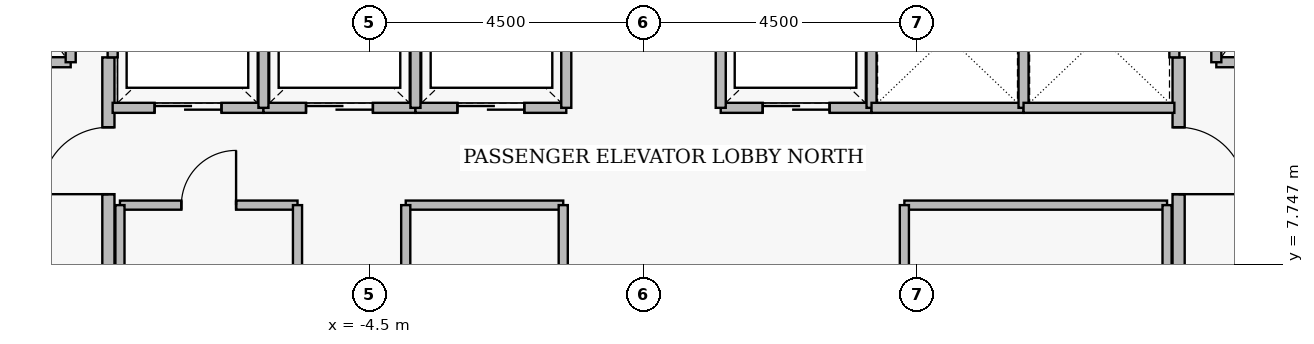
"""IFC4 building model, lengths in metres.
Left out: names, types, materials, properties, quantities, classifications, styles, units other than length and angle.
Written with IfcOpenShell. Run it as: python <this file> out.ifc"""

import sys

from ifc_helpers import new_model, si_unit, direction, frame, frame_2d, origin, place, context, subcontext, project, spatial, rectangle, extrude, element, fill, save


model = new_model("IFC4")
c1 = context("Model", 3, precision=1e-05, world=origin(), true_north=direction((0.0, 1.0)))
c2 = subcontext(c1, "Body", "Model", "MODEL_VIEW")
j1 = project(units=[si_unit("LENGTHUNIT", "METRE"), si_unit("PLANEANGLEUNIT", "RADIAN")], contexts=[c1])
p1 = place(None, origin())
s1 = spatial("IfcSite", under=j1, at=p1, CompositionType="ELEMENT")
p2 = place(p1, origin())
s2 = spatial("IfcBuilding", under=s1, at=p2, CompositionType="ELEMENT")
p3 = place(p2, frame((0.0, 0.0, 6.0)))
s3 = spatial("IfcBuildingStorey", under=s2, at=p3, CompositionType="ELEMENT", Elevation=6.0)
p4 = place(p3, frame((-8.8, 5.05, 0.0), z_axis=(0.0, 0.0, 1.0), x_axis=(0.0, 1.0, 0.0)))
e1 = element("IfcWall", 1, at=p4, inside=s3, PredefinedType="PARTITIONING", context=c2, shape_type="SweptSolid", body=[
    extrude(rectangle(XDim=6.1, YDim=0.2, at=frame_2d((3.05, 0.0))), origin(), (0.0, 0.0, 1.0), 5.14),
])
p5 = place(p4, frame((0.25, 0.0, 0.0)))
e2 = element("IfcOpeningElement", 2, at=p5, cuts=e1, PredefinedType="OPENING", context=c2, shape_type="SweptSolid", body=[
    extrude(rectangle(XDim=1.1, YDim=2.2, at=frame_2d((0.55, 1.1))), frame((0.0, 0.11, 0.0), z_axis=(0.0, -1.0, 0.0), x_axis=(1.0, 0.0, 0.0)), (0.0, 0.0, 1.0), 0.22),
])
p6 = place(p4, frame((3.85, 0.0, 0.0)))
e3 = element("IfcOpeningElement", 3, at=p6, cuts=e1, PredefinedType="OPENING", context=c2, shape_type="SweptSolid", body=[
    extrude(rectangle(XDim=1.1, YDim=2.2, at=frame_2d((0.55, 1.1))), frame((0.0, 0.11, 0.0), z_axis=(0.0, -1.0, 0.0), x_axis=(1.0, 0.0, 0.0)), (0.0, 0.0, 1.0), 0.22),
])
p7 = place(p3, frame((8.8, 11.15, 0.0), z_axis=(0.0, 0.0, 1.0), x_axis=(0.0, -1.0, 0.0)))
e4 = element("IfcWall", 4, at=p7, inside=s3, PredefinedType="PARTITIONING", context=c2, shape_type="SweptSolid", body=[
    extrude(rectangle(XDim=6.1, YDim=0.2, at=frame_2d((3.05, 0.0))), origin(), (0.0, 0.0, 1.0), 5.14),
])
p8 = place(p7, frame((1.15, 0.0, 0.0)))
e5 = element("IfcOpeningElement", 5, at=p8, cuts=e4, PredefinedType="OPENING", context=c2, shape_type="SweptSolid", body=[
    extrude(rectangle(XDim=1.1, YDim=2.2, at=frame_2d((0.55, 1.1))), frame((0.0, 0.11, 0.0), z_axis=(0.0, -1.0, 0.0), x_axis=(1.0, 0.0, 0.0)), (0.0, 0.0, 1.0), 0.22),
])
p9 = place(p7, frame((4.75, 0.0, 0.0)))
e6 = element("IfcOpeningElement", 6, at=p9, cuts=e4, PredefinedType="OPENING", context=c2, shape_type="SweptSolid", body=[
    extrude(rectangle(XDim=1.1, YDim=2.2, at=frame_2d((0.55, 1.1))), frame((0.0, 0.11, 0.0), z_axis=(0.0, -1.0, 0.0), x_axis=(1.0, 0.0, 0.0)), (0.0, 0.0, 1.0), 0.22),
])
p10 = place(p3, frame((-11.58, 11.07, 0.0), z_axis=(0.0, 0.0, 1.0), x_axis=(1.0, 0.0, 0.0)))
e7 = element("IfcWall", 7, at=p10, inside=s3, PredefinedType="PARTITIONING", context=c2, shape_type="SweptSolid", body=[
    extrude(rectangle(XDim=2.16, YDim=0.165, at=frame_2d((1.08, 0.0))), origin(), (0.0, 0.0, 1.0), 5.14),
])
p11 = place(p10, frame((0.53, 0.0, 0.0)))
e8 = element("IfcOpeningElement", 8, at=p11, cuts=e7, PredefinedType="OPENING", context=c2, shape_type="SweptSolid", body=[
    extrude(rectangle(XDim=1.15, YDim=2.25, at=frame_2d((0.575, 1.125))), frame((0.0, 0.093, 0.0), z_axis=(0.0, -1.0, 0.0), x_axis=(1.0, 0.0, 0.0)), (0.0, 0.0, 1.0), 0.185),
])
p12 = place(p3, frame((9.42, 11.07, 0.0), z_axis=(0.0, 0.0, 1.0), x_axis=(1.0, 0.0, 0.0)))
e9 = element("IfcWall", 9, at=p12, inside=s3, PredefinedType="PARTITIONING", context=c2, shape_type="SweptSolid", body=[
    extrude(rectangle(XDim=2.16, YDim=0.165, at=frame_2d((1.08, 0.0))), origin(), (0.0, 0.0, 1.0), 5.14),
])
p13 = place(p12, frame((0.53, 0.0, 0.0)))
e10 = element("IfcOpeningElement", 10, at=p13, cuts=e9, PredefinedType="OPENING", context=c2, shape_type="SweptSolid", body=[
    extrude(rectangle(XDim=1.15, YDim=2.25, at=frame_2d((0.575, 1.125))), frame((0.0, 0.093, 0.0), z_axis=(0.0, -1.0, 0.0), x_axis=(1.0, 0.0, 0.0)), (0.0, 0.0, 1.0), 0.185),
])
p14 = place(p3, frame((-8.73, 10.32, 0.0), z_axis=(0.0, 0.0, 1.0), x_axis=(1.0, 0.0, 0.0)))
e11 = element("IfcWall", 11, at=p14, inside=s3, PredefinedType="PARTITIONING", context=c2, shape_type="SweptSolid", body=[
    extrude(rectangle(XDim=2.48, YDim=0.165, at=frame_2d((1.24, 0.0))), origin(), (0.0, 0.0, 1.0), 5.14),
])
p15 = place(p14, frame((0.69, 0.0, 0.0)))
e12 = element("IfcOpeningElement", 12, at=p15, cuts=e11, PredefinedType="OPENING", context=c2, shape_type="SweptSolid", body=[
    extrude(rectangle(XDim=1.1, YDim=2.25, at=frame_2d((0.55, 1.125))), frame((0.0, 0.093, 0.0), z_axis=(0.0, -1.0, 0.0), x_axis=(1.0, 0.0, 0.0)), (0.0, 0.0, 1.0), 0.185),
])
p16 = place(p3, frame((-6.25, 10.32, 0.0), z_axis=(0.0, 0.0, 1.0), x_axis=(1.0, 0.0, 0.0)))
e13 = element("IfcWall", 13, at=p16, inside=s3, PredefinedType="PARTITIONING", context=c2, shape_type="SweptSolid", body=[
    extrude(rectangle(XDim=2.5, YDim=0.165, at=frame_2d((1.25, 0.0))), origin(), (0.0, 0.0, 1.0), 5.14),
])
p17 = place(p16, frame((0.7, 0.0, 0.0)))
e14 = element("IfcOpeningElement", 14, at=p17, cuts=e13, PredefinedType="OPENING", context=c2, shape_type="SweptSolid", body=[
    extrude(rectangle(XDim=1.1, YDim=2.25, at=frame_2d((0.55, 1.125))), frame((0.0, 0.093, 0.0), z_axis=(0.0, -1.0, 0.0), x_axis=(1.0, 0.0, 0.0)), (0.0, 0.0, 1.0), 0.185),
])
p18 = place(p3, frame((-3.75, 10.32, 0.0), z_axis=(0.0, 0.0, 1.0), x_axis=(1.0, 0.0, 0.0)))
e15 = element("IfcWall", 15, at=p18, inside=s3, PredefinedType="PARTITIONING", context=c2, shape_type="SweptSolid", body=[
    extrude(rectangle(XDim=2.48, YDim=0.165, at=frame_2d((1.24, 0.0))), origin(), (0.0, 0.0, 1.0), 5.14),
])
p19 = place(p18, frame((0.69, 0.0, 0.0)))
e16 = element("IfcOpeningElement", 16, at=p19, cuts=e15, PredefinedType="OPENING", context=c2, shape_type="SweptSolid", body=[
    extrude(rectangle(XDim=1.1, YDim=2.25, at=frame_2d((0.55, 1.125))), frame((0.0, 0.093, 0.0), z_axis=(0.0, -1.0, 0.0), x_axis=(1.0, 0.0, 0.0)), (0.0, 0.0, 1.0), 0.185),
])
p20 = place(p3, frame((1.27, 10.32, 0.0), z_axis=(0.0, 0.0, 1.0), x_axis=(1.0, 0.0, 0.0)))
e17 = element("IfcWall", 17, at=p20, inside=s3, PredefinedType="PARTITIONING", context=c2, shape_type="SweptSolid", body=[
    extrude(rectangle(XDim=2.48, YDim=0.165, at=frame_2d((1.24, 0.0))), origin(), (0.0, 0.0, 1.0), 5.14),
])
p21 = place(p20, frame((0.69, 0.0, 0.0)))
e18 = element("IfcOpeningElement", 18, at=p21, cuts=e17, PredefinedType="OPENING", context=c2, shape_type="SweptSolid", body=[
    extrude(rectangle(XDim=1.1, YDim=2.25, at=frame_2d((0.55, 1.125))), frame((0.0, 0.093, 0.0), z_axis=(0.0, -1.0, 0.0), x_axis=(1.0, 0.0, 0.0)), (0.0, 0.0, 1.0), 0.185),
])
p22 = place(p3, frame((-8.61, 8.72, 0.0), z_axis=(0.0, 0.0, 1.0), x_axis=(1.0, 0.0, 0.0)))
e19 = element("IfcWall", 19, at=p22, inside=s3, PredefinedType="PARTITIONING", context=c2, shape_type="SweptSolid", body=[
    extrude(rectangle(XDim=2.92, YDim=0.15, at=frame_2d((1.46, 0.0))), origin(), (0.0, 0.0, 1.0), 5.14),
])
p23 = place(p22, frame((1.01, 0.0, 0.0)))
e20 = element("IfcOpeningElement", 20, at=p23, cuts=e19, PredefinedType="OPENING", context=c2, shape_type="SweptSolid", body=[
    extrude(rectangle(XDim=0.9, YDim=2.15, at=frame_2d((0.45, 1.075))), frame((0.0, 0.085, 0.0), z_axis=(0.0, -1.0, 0.0), x_axis=(1.0, 0.0, 0.0)), (0.0, 0.0, 1.0), 0.17),
])
for number, where, z_axis, x_axis in (
    (21, (-9.42, 11.07, 0.0), (0.0, 0.0, 1.0), (0.0, 1.0, 0.0)),
    (22, (9.42, 11.07, 0.0), (0.0, 0.0, 1.0), (0.0, 1.0, 0.0)),
):
    element("IfcWall", number, at=place(p3, frame(where, z_axis=z_axis, x_axis=x_axis)), inside=s3, PredefinedType="PARTITIONING", context=c2, shape_type="SweptSolid", body=[
        extrude(rectangle(XDim=2.96, YDim=0.165, at=frame_2d((1.48, 0.0))), origin(), (0.0, 0.0, 1.0), 5.14),
    ])
p24 = place(p3, frame((-8.73, 11.15, 0.0), z_axis=(0.0, 0.0, 1.0), x_axis=(0.0, 1.0, 0.0)))
e23 = element("IfcWall", 23, at=p24, inside=s3, PredefinedType="PARTITIONING", context=c2, shape_type="SweptSolid", body=[
    extrude(rectangle(XDim=1.53, YDim=0.165, at=frame_2d((0.765, 0.0))), origin(), (0.0, 0.0, 1.0), 5.14),
])
for number, where, z_axis, x_axis in (
    (24, (-6.25, 10.32, 0.0), (0.0, 0.0, 1.0), (0.0, 1.0, 0.0)),
    (25, (-3.75, 10.32, 0.0), (0.0, 0.0, 1.0), (0.0, 1.0, 0.0)),
    (26, (-1.27, 10.32, 0.0), (0.0, 0.0, 1.0), (0.0, 1.0, 0.0)),
    (27, (1.27, 10.32, 0.0), (0.0, 0.0, 1.0), (0.0, 1.0, 0.0)),
    (28, (3.75, 10.32, 0.0), (0.0, 0.0, 1.0), (0.0, 1.0, 0.0)),
):
    element("IfcWall", number, at=place(p3, frame(where, z_axis=z_axis, x_axis=x_axis)), inside=s3, PredefinedType="PARTITIONING", context=c2, shape_type="SweptSolid", body=[
        extrude(rectangle(XDim=2.36, YDim=0.165, at=frame_2d((1.18, 0.0))), origin(), (0.0, 0.0, 1.0), 5.14),
    ])
p25 = place(p3, frame((3.75, 10.32, 0.0), z_axis=(0.0, 0.0, 1.0), x_axis=(1.0, 0.0, 0.0)))
e29 = element("IfcWall", 29, at=p25, inside=s3, PredefinedType="PARTITIONING", context=c2, shape_type="SweptSolid", body=[
    extrude(rectangle(XDim=2.5, YDim=0.165, at=frame_2d((1.25, 0.0))), origin(), (0.0, 0.0, 1.0), 5.14),
])
p26 = place(p3, frame((6.25, 10.32, 0.0), z_axis=(0.0, 0.0, 1.0), x_axis=(0.0, 1.0, 0.0)))
e30 = element("IfcWall", 30, at=p26, inside=s3, PredefinedType="PARTITIONING", context=c2, shape_type="SweptSolid", body=[
    extrude(rectangle(XDim=2.36, YDim=0.165, at=frame_2d((1.18, 0.0))), origin(), (0.0, 0.0, 1.0), 5.14),
])
p27 = place(p3, frame((6.25, 10.32, 0.0), z_axis=(0.0, 0.0, 1.0), x_axis=(1.0, 0.0, 0.0)))
e31 = element("IfcWall", 31, at=p27, inside=s3, PredefinedType="PARTITIONING", context=c2, shape_type="SweptSolid", body=[
    extrude(rectangle(XDim=2.48, YDim=0.165, at=frame_2d((1.24, 0.0))), origin(), (0.0, 0.0, 1.0), 5.14),
])
p28 = place(p3, frame((8.73, 11.15, 0.0), z_axis=(0.0, 0.0, 1.0), x_axis=(0.0, 1.0, 0.0)))
e32 = element("IfcWall", 32, at=p28, inside=s3, PredefinedType="PARTITIONING", context=c2, shape_type="SweptSolid", body=[
    extrude(rectangle(XDim=1.53, YDim=0.165, at=frame_2d((0.765, 0.0))), origin(), (0.0, 0.0, 1.0), 5.14),
])
for number, where, z_axis, x_axis in (
    (33, (-8.61, 6.48, 0.0), (0.0, 0.0, 1.0), (0.0, 1.0, 0.0)),
    (34, (-5.69, 6.48, 0.0), (0.0, 0.0, 1.0), (0.0, 1.0, 0.0)),
):
    element("IfcWall", number, at=place(p3, frame(where, z_axis=z_axis, x_axis=x_axis)), inside=s3, PredefinedType="PARTITIONING", context=c2, shape_type="SweptSolid", body=[
        extrude(rectangle(XDim=2.24, YDim=0.15, at=frame_2d((1.12, 0.0))), origin(), (0.0, 0.0, 1.0), 5.14),
    ])
p29 = place(p3, frame((-3.91, 8.72, 0.0), z_axis=(0.0, 0.0, 1.0), x_axis=(1.0, 0.0, 0.0)))
e35 = element("IfcWall", 35, at=p29, inside=s3, PredefinedType="PARTITIONING", context=c2, shape_type="SweptSolid", body=[
    extrude(rectangle(XDim=2.59, YDim=0.15, at=frame_2d((1.295, 0.0))), origin(), (0.0, 0.0, 1.0), 5.14),
])
for number, where, z_axis, x_axis in (
    (36, (-3.91, 6.48, 0.0), (0.0, 0.0, 1.0), (0.0, 1.0, 0.0)),
    (37, (-1.32, 6.48, 0.0), (0.0, 0.0, 1.0), (0.0, 1.0, 0.0)),
):
    element("IfcWall", number, at=place(p3, frame(where, z_axis=z_axis, x_axis=x_axis)), inside=s3, PredefinedType="PARTITIONING", context=c2, shape_type="SweptSolid", body=[
        extrude(rectangle(XDim=2.24, YDim=0.15, at=frame_2d((1.12, 0.0))), origin(), (0.0, 0.0, 1.0), 5.14),
    ])
p30 = place(p3, frame((4.29, 8.72, 0.0), z_axis=(0.0, 0.0, 1.0), x_axis=(1.0, 0.0, 0.0)))
e38 = element("IfcWall", 38, at=p30, inside=s3, PredefinedType="PARTITIONING", context=c2, shape_type="SweptSolid", body=[
    extrude(rectangle(XDim=4.32, YDim=0.15, at=frame_2d((2.16, 0.0))), origin(), (0.0, 0.0, 1.0), 5.14),
])
for number, where, z_axis, x_axis in (
    (39, (4.29, 6.48, 0.0), (0.0, 0.0, 1.0), (0.0, 1.0, 0.0)),
    (40, (8.61, 6.48, 0.0), (0.0, 0.0, 1.0), (0.0, 1.0, 0.0)),
):
    element("IfcWall", number, at=place(p3, frame(where, z_axis=z_axis, x_axis=x_axis)), inside=s3, PredefinedType="PARTITIONING", context=c2, shape_type="SweptSolid", body=[
        extrude(rectangle(XDim=2.24, YDim=0.15, at=frame_2d((1.12, 0.0))), origin(), (0.0, 0.0, 1.0), 5.14),
    ])
p31 = place(p6, origin())
e41 = element("IfcDoor", 41, at=p31, inside=s3, OperationType="SINGLE_SWING_LEFT", PredefinedType="DOOR", context=c2, shape_type="SweptSolid", body=[
    extrude(rectangle(XDim=1.1, YDim=2.2, at=frame_2d((0.55, 1.1))), frame((0.0, 0.025, 0.0), z_axis=(0.0, -1.0, 0.0), x_axis=(1.0, 0.0, 0.0)), (0.0, 0.0, 1.0), 0.05),
])
fill(e3, e41)
p32 = place(p8, origin())
e42 = element("IfcDoor", 42, at=p32, inside=s3, OperationType="SINGLE_SWING_RIGHT", PredefinedType="DOOR", context=c2, shape_type="SweptSolid", body=[
    extrude(rectangle(XDim=1.1, YDim=2.2, at=frame_2d((0.55, 1.1))), frame((0.0, 0.025, 0.0), z_axis=(0.0, -1.0, 0.0), x_axis=(1.0, 0.0, 0.0)), (0.0, 0.0, 1.0), 0.05),
])
fill(e5, e42)
p33 = place(p15, origin())
e43 = element("IfcDoor", 43, at=p33, inside=s3, OperationType="SLIDING_TO_LEFT", PredefinedType="DOOR", context=c2, shape_type="SweptSolid", body=[
    extrude(rectangle(XDim=1.1, YDim=2.25, at=frame_2d((0.55, 1.125))), frame((0.0, 0.025, 0.0), z_axis=(0.0, -1.0, 0.0), x_axis=(1.0, 0.0, 0.0)), (0.0, 0.0, 1.0), 0.05),
])
fill(e12, e43)
p34 = place(p17, origin())
e44 = element("IfcDoor", 44, at=p34, inside=s3, OperationType="SLIDING_TO_LEFT", PredefinedType="DOOR", context=c2, shape_type="SweptSolid", body=[
    extrude(rectangle(XDim=1.1, YDim=2.25, at=frame_2d((0.55, 1.125))), frame((0.0, 0.025, 0.0), z_axis=(0.0, -1.0, 0.0), x_axis=(1.0, 0.0, 0.0)), (0.0, 0.0, 1.0), 0.05),
])
fill(e14, e44)
p35 = place(p19, origin())
e45 = element("IfcDoor", 45, at=p35, inside=s3, OperationType="SLIDING_TO_LEFT", PredefinedType="DOOR", context=c2, shape_type="SweptSolid", body=[
    extrude(rectangle(XDim=1.1, YDim=2.25, at=frame_2d((0.55, 1.125))), frame((0.0, 0.025, 0.0), z_axis=(0.0, -1.0, 0.0), x_axis=(1.0, 0.0, 0.0)), (0.0, 0.0, 1.0), 0.05),
])
fill(e16, e45)
p36 = place(p21, origin())
e46 = element("IfcDoor", 46, at=p36, inside=s3, OperationType="SLIDING_TO_LEFT", PredefinedType="DOOR", context=c2, shape_type="SweptSolid", body=[
    extrude(rectangle(XDim=1.1, YDim=2.25, at=frame_2d((0.55, 1.125))), frame((0.0, 0.025, 0.0), z_axis=(0.0, -1.0, 0.0), x_axis=(1.0, 0.0, 0.0)), (0.0, 0.0, 1.0), 0.05),
])
fill(e18, e46)
p37 = place(p23, origin())
e47 = element("IfcDoor", 47, at=p37, inside=s3, OperationType="SINGLE_SWING_RIGHT", PredefinedType="DOOR", context=c2, shape_type="SweptSolid", body=[
    extrude(rectangle(XDim=0.9, YDim=2.15, at=frame_2d((0.45, 1.075))), frame((0.0, 0.025, 0.0), z_axis=(0.0, -1.0, 0.0), x_axis=(1.0, 0.0, 0.0)), (0.0, 0.0, 1.0), 0.05),
])
fill(e20, e47)
save(model, sys.argv[1])
